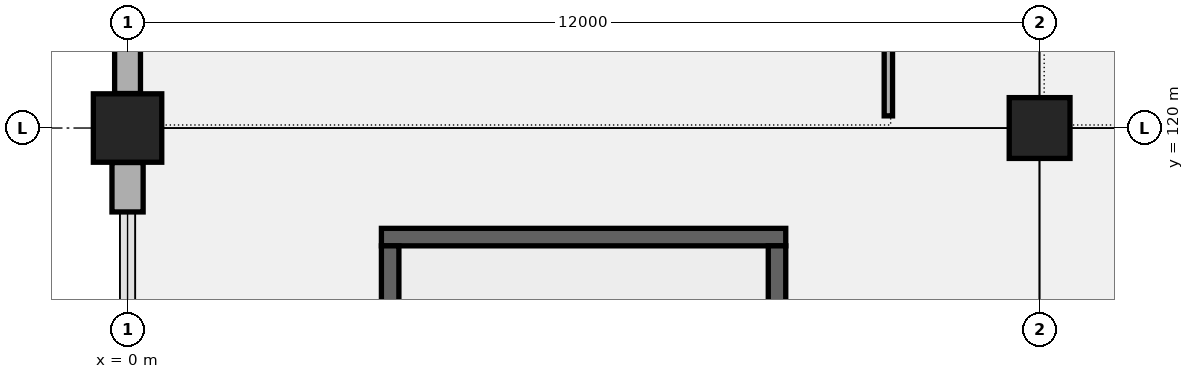
"""IFC4 building model, lengths in metres.
Left out: names, types, materials, properties, quantities, classifications, styles, units other than length and angle.
Written with IfcOpenShell. Run it as: python <this file> out.ifc"""

import sys

from ifc_helpers import new_model, si_unit, direction, frame, frame_2d, origin, origin_2d, place, context, subcontext, project, spatial, rectangle, extrude, element, save


model = new_model("IFC4")
c1 = context("Model", 3, precision=1e-05, world=origin(), true_north=direction((0.0, 1.0)))
c2 = subcontext(c1, "Body", "Model", "MODEL_VIEW")
j1 = project(units=[si_unit("LENGTHUNIT", "METRE"), si_unit("PLANEANGLEUNIT", "RADIAN")], contexts=[c1])
p1 = place(None, origin())
s1 = spatial("IfcSite", under=j1, at=p1, CompositionType="ELEMENT")
p2 = place(p1, origin())
s2 = spatial("IfcBuilding", under=s1, at=p2, CompositionType="ELEMENT")
p3 = place(p2, frame((0.0, 0.0, 5.4)))
s3 = spatial("IfcBuildingStorey", under=s2, at=p3, CompositionType="ELEMENT", Elevation=5.4)
p4 = place(p3, frame((0.0, 120.0, 0.0), z_axis=(0.0, 0.0, 1.0), x_axis=(1.0, 0.0, 0.0)))
e1 = element("IfcColumn", 1, at=p4, inside=s3, PredefinedType="COLUMN", context=c2, shape_type="SweptSolid", body=[
    extrude(rectangle(XDim=0.9, YDim=0.9, at=origin_2d()), origin(), (0.0, 0.0, 1.0), 4.8),
])
p5 = place(p3, frame((12.0, 120.0, 0.0), z_axis=(0.0, 0.0, 1.0), x_axis=(1.0, 0.0, 0.0)))
e2 = element("IfcColumn", 2, at=p5, inside=s3, PredefinedType="COLUMN", context=c2, shape_type="SweptSolid", body=[
    extrude(rectangle(XDim=0.8, YDim=0.8, at=origin_2d()), origin(), (0.0, 0.0, 1.0), 4.8),
])
p6 = place(p3, frame((0.0, 118.896, 0.0), z_axis=(0.0, 0.0, 1.0), x_axis=(0.0, 1.0, 0.0)))
e3 = element("IfcWall", 3, at=p6, inside=s3, PredefinedType="SOLIDWALL", context=c2, shape_type="SweptSolid", body=[
    extrude(rectangle(XDim=0.65, YDim=0.41, at=frame_2d((0.325, 0.0))), origin(), (0.0, 0.0, 1.0), 4.2),
])
p7 = place(p3, frame((0.0, 120.454, 0.0), z_axis=(0.0, 0.0, 1.0), x_axis=(0.0, 1.0, 0.0)))
e4 = element("IfcWall", 4, at=p7, inside=s3, PredefinedType="SOLIDWALL", context=c2, shape_type="SweptSolid", body=[
    extrude(rectangle(XDim=11.142, YDim=0.34, at=frame_2d((5.571, 0.0))), origin(), (0.0, 0.0, 1.0), 4.15),
])
p8 = place(p7, frame((1.5, 0.0, 0.95)))
e5 = element("IfcOpeningElement", 5, at=p8, cuts=e4, PredefinedType="OPENING", context=c2, shape_type="SweptSolid", body=[
    extrude(rectangle(XDim=2.4, YDim=1.65, at=frame_2d((1.2, 0.825))), frame((0.0, 0.18, 0.0), z_axis=(0.0, -1.0, 0.0), x_axis=(1.0, 0.0, 0.0)), (0.0, 0.0, 1.0), 0.36),
])
p9 = place(p3, frame((3.34, 118.565, 0.0), z_axis=(0.0, 0.0, 1.0), x_axis=(1.0, 0.0, 0.0)))
e6 = element("IfcWall", 6, at=p9, inside=s3, PredefinedType="SHEAR", context=c2, shape_type="SweptSolid", body=[
    extrude(rectangle(XDim=5.32, YDim=0.23, at=frame_2d((2.66, 0.0))), origin(), (0.0, 0.0, 1.0), 4.55),
])
for number, where, z_axis, x_axis in (
    (7, (3.455, 109.55, 0.0), (0.0, 0.0, 1.0), (0.0, 1.0, 0.0)),
    (8, (8.545, 109.55, 0.0), (0.0, 0.0, 1.0), (0.0, 1.0, 0.0)),
):
    element("IfcWall", number, at=place(p3, frame(where, z_axis=z_axis, x_axis=x_axis)), inside=s3, PredefinedType="SHEAR", context=c2, shape_type="SweptSolid", body=[
        extrude(rectangle(XDim=8.9, YDim=0.23, at=frame_2d((4.45, 0.0))), origin(), (0.0, 0.0, 1.0), 4.55),
    ])
p10 = place(p3, frame((10.01, 120.16, 0.0), z_axis=(0.0, 0.0, 1.0), x_axis=(0.0, 1.0, 0.0)))
e9 = element("IfcWall", 9, at=p10, inside=s3, PredefinedType="PARTITIONING", context=c2, shape_type="SweptSolid", body=[
    extrude(rectangle(XDim=11.68, YDim=0.11, at=frame_2d((5.84, 0.0))), origin(), (0.0, 0.0, 1.0), 3.92),
])
p11 = place(p10, frame((5.06, 0.0, 0.0)))
e10 = element("IfcOpeningElement", 10, at=p11, cuts=e9, PredefinedType="OPENING", context=c2, shape_type="SweptSolid", body=[
    extrude(rectangle(XDim=1.56, YDim=2.26, at=frame_2d((0.78, 1.13))), frame((0.0, 0.065, 0.0), z_axis=(0.0, -1.0, 0.0), x_axis=(1.0, 0.0, 0.0)), (0.0, 0.0, 1.0), 0.13),
])
save(model, sys.argv[1])
